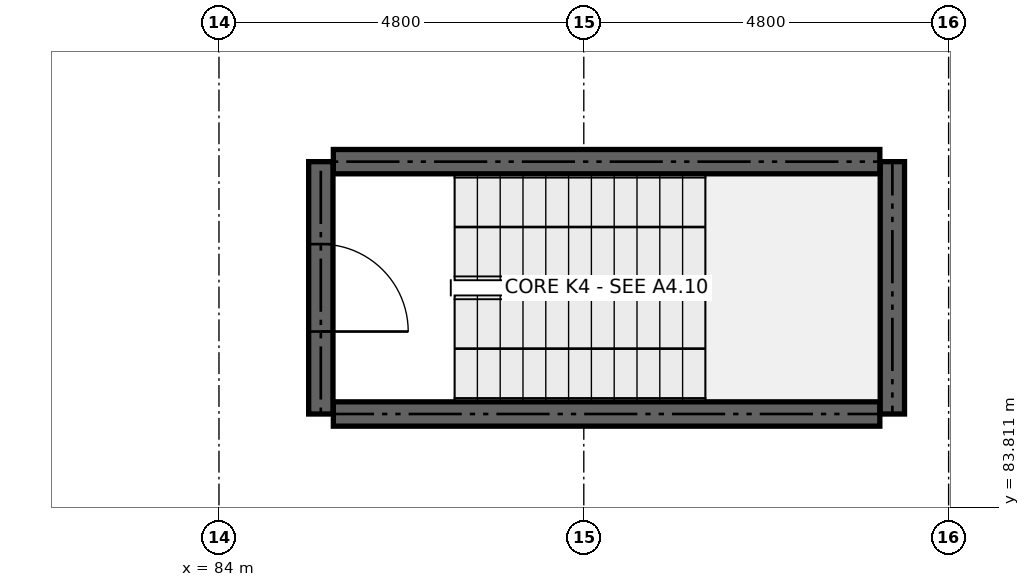
"""IFC4 building model, lengths in metres.
Left out: names, types, materials, properties, quantities, classifications, styles, units other than length and angle.
Written with IfcOpenShell. Run it as: python <this file> out.ifc"""

import sys

from ifc_helpers import new_model, si_unit, direction, frame, frame_2d, origin, place, context, subcontext, project, spatial, rectangle, extrude, element, fill, save


model = new_model("IFC4")
c1 = context("Model", 3, precision=1e-05, world=origin(), true_north=direction((0.0, 1.0)))
c2 = subcontext(c1, "Body", "Model", "MODEL_VIEW")
j1 = project(units=[si_unit("LENGTHUNIT", "METRE"), si_unit("PLANEANGLEUNIT", "RADIAN")], contexts=[c1])
p1 = place(None, origin())
s1 = spatial("IfcSite", under=j1, at=p1, CompositionType="ELEMENT")
p2 = place(p1, origin())
s2 = spatial("IfcBuilding", under=s1, at=p2, CompositionType="ELEMENT")
p3 = place(p2, frame((0.0, 0.0, -4.2)))
s3 = spatial("IfcBuildingStorey", under=s2, at=p3, CompositionType="ELEMENT", Elevation=-4.2)
p4 = place(p3, frame((85.505, 85.04, 0.0), z_axis=(0.0, 0.0, 1.0), x_axis=(1.0, 0.0, 0.0)))
e1 = element("IfcWall", 1, at=p4, inside=s3, PredefinedType="SHEAR", context=c2, shape_type="SweptSolid", body=[
    extrude(rectangle(XDim=7.19, YDim=0.32, at=frame_2d((3.595, 0.0))), origin(), (0.0, 0.0, 1.0), 3.78),
])
p5 = place(p3, frame((92.86, 85.04, 0.0), z_axis=(0.0, 0.0, 1.0), x_axis=(0.0, 1.0, 0.0)))
e2 = element("IfcWall", 2, at=p5, inside=s3, PredefinedType="SHEAR", context=c2, shape_type="SweptSolid", body=[
    extrude(rectangle(XDim=3.32, YDim=0.32, at=frame_2d((1.66, 0.0))), origin(), (0.0, 0.0, 1.0), 3.78),
])
p6 = place(p3, frame((92.695, 88.36, 0.0), z_axis=(0.0, 0.0, 1.0), x_axis=(-1.0, 0.0, 0.0)))
e3 = element("IfcWall", 3, at=p6, inside=s3, PredefinedType="SHEAR", context=c2, shape_type="SweptSolid", body=[
    extrude(rectangle(XDim=7.19, YDim=0.32, at=frame_2d((3.595, 0.0))), origin(), (0.0, 0.0, 1.0), 3.78),
])
p7 = place(p3, frame((85.34, 88.36, 0.0), z_axis=(0.0, 0.0, 1.0), x_axis=(0.0, -1.0, 0.0)))
e4 = element("IfcWall", 4, at=p7, inside=s3, PredefinedType="SHEAR", context=c2, shape_type="SweptSolid", body=[
    extrude(rectangle(XDim=3.32, YDim=0.32, at=frame_2d((1.66, 0.0))), origin(), (0.0, 0.0, 1.0), 3.78),
])
p8 = place(p7, frame((1.085, 0.0, 0.0)))
e5 = element("IfcOpeningElement", 5, at=p8, cuts=e4, PredefinedType="OPENING", context=c2, shape_type="SweptSolid", body=[
    extrude(rectangle(XDim=1.15, YDim=2.15, at=frame_2d((0.575, 1.075))), frame((0.0, 0.172, 0.0), z_axis=(0.0, -1.0, 0.0), x_axis=(1.0, 0.0, 0.0)), (0.0, 0.0, 1.0), 0.344),
])
p9 = place(p8, origin())
e6 = element("IfcDoor", 6, at=p9, inside=s3, OperationType="SINGLE_SWING_RIGHT", PredefinedType="DOOR", context=c2, shape_type="SweptSolid", body=[
    extrude(rectangle(XDim=1.15, YDim=2.15, at=frame_2d((0.575, 1.075))), frame((0.0, 0.025, 0.0), z_axis=(0.0, -1.0, 0.0), x_axis=(1.0, 0.0, 0.0)), (0.0, 0.0, 1.0), 0.05),
])
fill(e5, e6)
save(model, sys.argv[1])
